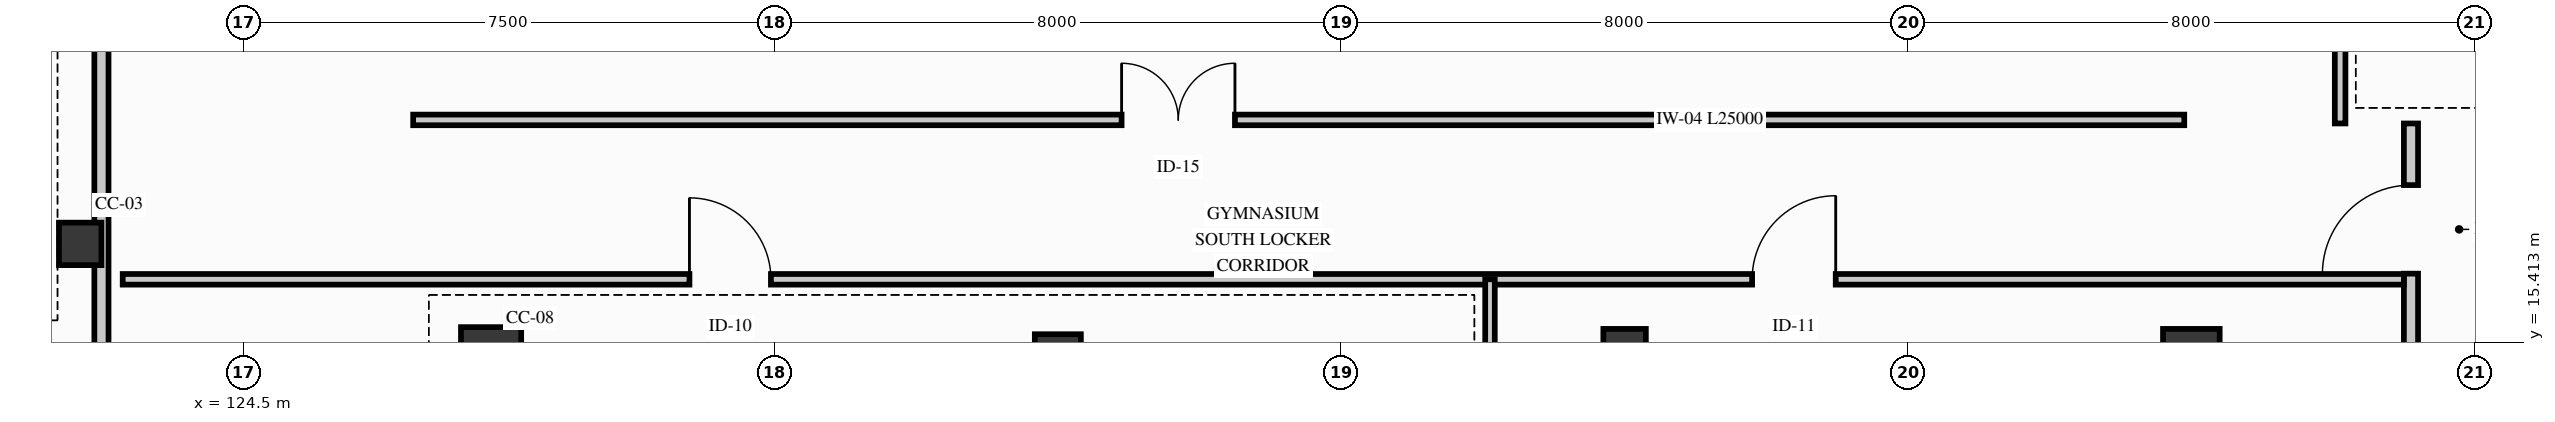
"""IFC4 building model, lengths in metres.
Left out: names, types, materials, properties, quantities, classifications, styles, units other than length and angle.
Written with IfcOpenShell. Run it as: python <this file> out.ifc"""

import sys

from ifc_helpers import new_model, si_unit, direction, frame, frame_2d, origin, origin_2d, place, context, subcontext, project, spatial, rectangle, extrude, element, fill, save


model = new_model("IFC4")
c1 = context("Model", 3, precision=1e-05, world=origin(), true_north=direction((0.0, 1.0)))
c2 = subcontext(c1, "Body", "Model", "MODEL_VIEW")
j1 = project(units=[si_unit("LENGTHUNIT", "METRE"), si_unit("PLANEANGLEUNIT", "RADIAN")], contexts=[c1])
p1 = place(None, origin())
s1 = spatial("IfcSite", under=j1, at=p1, CompositionType="ELEMENT")
p2 = place(p1, origin())
s2 = spatial("IfcBuilding", under=s1, at=p2, CompositionType="ELEMENT")
p3 = place(p2, origin())
s3 = spatial("IfcBuildingStorey", under=s2, at=p3, CompositionType="ELEMENT", Elevation=0.0)
p4 = place(p3, frame((122.2, 16.8, 0.0), z_axis=(0.0, 0.0, 1.0), x_axis=(1.0, 0.0, 0.0)))
e1 = element("IfcColumn", 1, at=p4, inside=s3, PredefinedType="COLUMN", context=c2, shape_type="SweptSolid", body=[
    extrude(rectangle(XDim=0.6, YDim=0.6, at=origin_2d()), origin(), (0.0, 0.0, 1.0), 5.1),
])
p5 = place(p3, frame((128.0, 15.2, 0.0), z_axis=(0.0, 0.0, 1.0), x_axis=(1.0, 0.0, 0.0)))
e2 = element("IfcColumn", 2, at=p5, inside=s3, PredefinedType="COLUMN", context=c2, shape_type="SweptSolid", body=[
    extrude(rectangle(XDim=0.85, YDim=0.85, at=origin_2d()), origin(), (0.0, 0.0, 1.0), 5.1),
])
p6 = place(p3, frame((136.0, 15.2, 0.0), z_axis=(0.0, 0.0, 1.0), x_axis=(1.0, 0.0, 0.0)))
e3 = element("IfcColumn", 3, at=p6, inside=s3, PredefinedType="COLUMN", context=c2, shape_type="SweptSolid", body=[
    extrude(rectangle(XDim=0.65, YDim=0.65, at=origin_2d()), origin(), (0.0, 0.0, 1.0), 5.1),
])
p7 = place(p3, frame((144.0, 15.2, 0.0), z_axis=(0.0, 0.0, 1.0), x_axis=(1.0, 0.0, 0.0)))
e4 = element("IfcColumn", 4, at=p7, inside=s3, PredefinedType="COLUMN", context=c2, shape_type="SweptSolid", body=[
    extrude(rectangle(XDim=0.6, YDim=0.8, at=origin_2d()), origin(), (0.0, 0.0, 1.0), 5.1),
])
p8 = place(p3, frame((152.0, 15.2, 0.0), z_axis=(0.0, 0.0, 1.0), x_axis=(1.0, 0.0, 0.0)))
e5 = element("IfcColumn", 5, at=p8, inside=s3, PredefinedType="COLUMN", context=c2, shape_type="SweptSolid", body=[
    extrude(rectangle(XDim=0.8, YDim=0.8, at=origin_2d()), origin(), (0.0, 0.0, 1.0), 5.1),
])
p9 = place(p3, frame((155.1, 6.78, 0.0), z_axis=(0.0, 0.0, 1.0), x_axis=(0.0, 1.0, 0.0)))
e6 = element("IfcWall", 6, at=p9, inside=s3, PredefinedType="PARTITIONING", context=c2, shape_type="SweptSolid", body=[
    extrude(rectangle(XDim=11.72, YDim=0.2, at=frame_2d((5.86, 0.0))), origin(), (0.0, 0.0, 1.0), 4.368),
])
p10 = place(p9, frame((9.6, 0.0, 0.0)))
e7 = element("IfcOpeningElement", 7, at=p10, cuts=e6, PredefinedType="OPENING", context=c2, shape_type="SweptSolid", body=[
    extrude(rectangle(XDim=1.25, YDim=2.2, at=frame_2d((0.625, 1.1))), frame((0.0, 0.11, 0.0), z_axis=(0.0, -1.0, 0.0), x_axis=(1.0, 0.0, 0.0)), (0.0, 0.0, 1.0), 0.22),
])
p11 = place(p3, frame((122.5, 6.8, 0.0), z_axis=(0.0, 0.0, 1.0), x_axis=(0.0, 1.0, 0.0)))
e8 = element("IfcWall", 8, at=p11, inside=s3, PredefinedType="PARTITIONING", context=c2, shape_type="SweptSolid", body=[
    extrude(rectangle(XDim=36.2, YDim=0.2, at=frame_2d((18.1, 0.0))), origin(), (0.0, 0.0, 1.0), 4.86),
])
p12 = place(p11, frame((29.3, 0.0, 0.0)))
e9 = element("IfcOpeningElement", 9, at=p12, cuts=e8, PredefinedType="OPENING", context=c2, shape_type="SweptSolid", body=[
    extrude(rectangle(XDim=1.6, YDim=2.3, at=frame_2d((0.8, 1.15))), frame((0.0, 0.11, 0.0), z_axis=(0.0, -1.0, 0.0), x_axis=(1.0, 0.0, 0.0)), (0.0, 0.0, 1.0), 0.22),
])
p13 = place(p3, frame((122.8, 16.3, 0.0), z_axis=(0.0, 0.0, 1.0), x_axis=(1.0, 0.0, 0.0)))
e10 = element("IfcWall", 10, at=p13, inside=s3, PredefinedType="PARTITIONING", context=c2, shape_type="SweptSolid", body=[
    extrude(rectangle(XDim=32.2, YDim=0.15, at=frame_2d((16.1, 0.0))), origin(), (0.0, 0.0, 1.0), 4.328),
])
p14 = place(p13, frame((8.0, 0.0, 0.0)))
e11 = element("IfcOpeningElement", 11, at=p14, cuts=e10, PredefinedType="OPENING", context=c2, shape_type="SweptSolid", body=[
    extrude(rectangle(XDim=1.15, YDim=2.2, at=frame_2d((0.575, 1.1))), frame((0.0, 0.085, 0.0), z_axis=(0.0, -1.0, 0.0), x_axis=(1.0, 0.0, 0.0)), (0.0, 0.0, 1.0), 0.17),
])
p15 = place(p13, frame((23.0, 0.0, 0.0)))
e12 = element("IfcOpeningElement", 12, at=p15, cuts=e10, PredefinedType="OPENING", context=c2, shape_type="SweptSolid", body=[
    extrude(rectangle(XDim=1.18, YDim=2.24, at=frame_2d((0.59, 1.12))), frame((0.0, 0.085, 0.0), z_axis=(0.0, -1.0, 0.0), x_axis=(1.0, 0.0, 0.0)), (0.0, 0.0, 1.0), 0.17),
])
p16 = place(p3, frame((126.9, 18.55, 0.0), z_axis=(0.0, 0.0, 1.0), x_axis=(1.0, 0.0, 0.0)))
e13 = element("IfcWall", 13, at=p16, inside=s3, PredefinedType="PARTITIONING", context=c2, shape_type="SweptSolid", body=[
    extrude(rectangle(XDim=25.0, YDim=0.15, at=frame_2d((12.5, 0.0))), origin(), (0.0, 0.0, 1.0), 4.86),
])
p17 = place(p16, frame((10.0, 0.0, 0.0)))
e14 = element("IfcOpeningElement", 14, at=p17, cuts=e13, PredefinedType="OPENING", context=c2, shape_type="SweptSolid", body=[
    extrude(rectangle(XDim=1.6, YDim=2.3, at=frame_2d((0.8, 1.15))), frame((0.0, 0.085, 0.0), z_axis=(0.0, -1.0, 0.0), x_axis=(1.0, 0.0, 0.0)), (0.0, 0.0, 1.0), 0.17),
])
p18 = place(p3, frame((142.1, 6.8, 0.0), z_axis=(0.0, 0.0, 1.0), x_axis=(0.0, 1.0, 0.0)))
e15 = element("IfcWall", 15, at=p18, inside=s3, PredefinedType="PARTITIONING", context=c2, shape_type="SweptSolid", body=[
    extrude(rectangle(XDim=9.5, YDim=0.135, at=frame_2d((4.75, 0.0))), origin(), (0.0, 0.0, 1.0), 4.86),
])
p19 = place(p3, frame((154.1, 18.5, 0.0), z_axis=(0.0, 0.0, 1.0), x_axis=(0.0, 1.0, 0.0)))
e16 = element("IfcWall", 16, at=p19, inside=s3, PredefinedType="PARTITIONING", context=c2, shape_type="SweptSolid", body=[
    extrude(rectangle(XDim=14.8, YDim=0.15, at=frame_2d((7.4, 0.0))), origin(), (0.0, 0.0, 1.0), 4.86),
])
p20 = place(p19, frame((6.0, 0.0, 0.0)))
e17 = element("IfcOpeningElement", 17, at=p20, cuts=e16, PredefinedType="OPENING", context=c2, shape_type="SweptSolid", body=[
    extrude(rectangle(XDim=1.12, YDim=2.2, at=frame_2d((0.56, 1.1))), frame((0.0, 0.085, 0.0), z_axis=(0.0, -1.0, 0.0), x_axis=(1.0, 0.0, 0.0)), (0.0, 0.0, 1.0), 0.17),
])
p21 = place(p10, origin())
e18 = element("IfcDoor", 18, at=p21, inside=s3, OperationType="SINGLE_SWING_LEFT", PredefinedType="DOOR", context=c2, shape_type="SweptSolid", body=[
    extrude(rectangle(XDim=1.25, YDim=2.2, at=frame_2d((0.625, 1.1))), frame((0.0, 0.025, 0.0), z_axis=(0.0, -1.0, 0.0), x_axis=(1.0, 0.0, 0.0)), (0.0, 0.0, 1.0), 0.05),
])
fill(e7, e18)
p22 = place(p14, origin())
e19 = element("IfcDoor", 19, at=p22, inside=s3, OperationType="SINGLE_SWING_LEFT", PredefinedType="DOOR", context=c2, shape_type="SweptSolid", body=[
    extrude(rectangle(XDim=1.15, YDim=2.2, at=frame_2d((0.575, 1.1))), frame((0.0, 0.025, 0.0), z_axis=(0.0, -1.0, 0.0), x_axis=(1.0, 0.0, 0.0)), (0.0, 0.0, 1.0), 0.05),
])
fill(e11, e19)
p23 = place(p15, origin())
e20 = element("IfcDoor", 20, at=p23, inside=s3, OperationType="SINGLE_SWING_RIGHT", PredefinedType="DOOR", context=c2, shape_type="SweptSolid", body=[
    extrude(rectangle(XDim=1.18, YDim=2.24, at=frame_2d((0.59, 1.12))), frame((0.0, 0.025, 0.0), z_axis=(0.0, -1.0, 0.0), x_axis=(1.0, 0.0, 0.0)), (0.0, 0.0, 1.0), 0.05),
])
fill(e12, e20)
p24 = place(p17, origin())
e21 = element("IfcDoor", 21, at=p24, inside=s3, OperationType="DOUBLE_DOOR_SINGLE_SWING", PredefinedType="DOOR", context=c2, shape_type="SweptSolid", body=[
    extrude(rectangle(XDim=1.6, YDim=2.3, at=frame_2d((0.8, 1.15))), frame((0.0, 0.025, 0.0), z_axis=(0.0, -1.0, 0.0), x_axis=(1.0, 0.0, 0.0)), (0.0, 0.0, 1.0), 0.05),
])
fill(e14, e21)
save(model, sys.argv[1])
